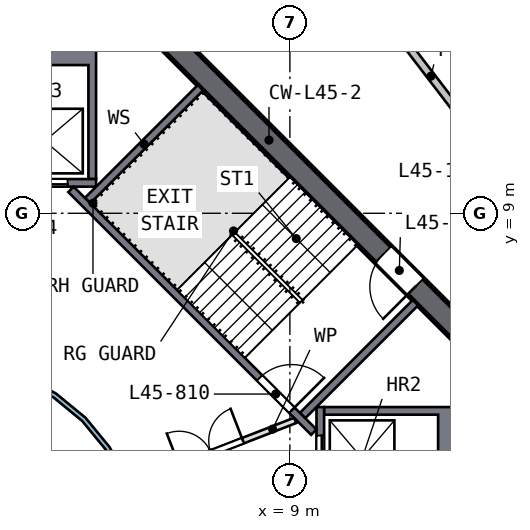
"""IFC4 building model, lengths in metres.
Left out: names, types, materials, properties, quantities, classifications, styles, units other than length and angle.
Written with IfcOpenShell. Run it as: python <this file> out.ifc"""

import sys

from ifc_helpers import new_model, si_unit, direction, frame, frame_2d, origin, place, context, subcontext, project, spatial, polyline, rectangle, outline, extrude, element, fill, save


model = new_model("IFC4")
c1 = context("Model", 3, precision=1e-05, world=origin(), true_north=direction((0.0, 1.0)))
c2 = subcontext(c1, "Body", "Model", "MODEL_VIEW")
j1 = project(units=[si_unit("LENGTHUNIT", "METRE"), si_unit("PLANEANGLEUNIT", "RADIAN")], contexts=[c1])
p1 = place(None, origin())
s1 = spatial("IfcSite", under=j1, at=p1, CompositionType="ELEMENT")
p2 = place(p1, origin())
s2 = spatial("IfcBuilding", under=s1, at=p2, CompositionType="ELEMENT")
p3 = place(p2, frame((0.0, 0.0, 187.0)))
s3 = spatial("IfcBuildingStorey", under=s2, at=p3, CompositionType="ELEMENT", Elevation=187.0)
p4 = place(p3, frame((13.788, 5.587, 0.0), z_axis=(0.0, 0.0, 1.0), x_axis=(-0.707106781, 0.707106781, 0.0)))
e1 = element("IfcWall", 1, at=p4, inside=s3, PredefinedType="SHEAR", context=c2, shape_type="SweptSolid", body=[
    extrude(rectangle(XDim=11.598, YDim=0.6, at=frame_2d((5.799, 0.0))), origin(), (0.0, 0.0, 1.0), 3.5),
])
p5 = place(p4, frame((2.099, 0.0, 0.0)))
e2 = element("IfcOpeningElement", 2, at=p5, cuts=e1, PredefinedType="OPENING", context=c2, shape_type="SweptSolid", body=[
    extrude(rectangle(XDim=1.2, YDim=2.1, at=frame_2d((0.6, 1.05))), frame((0.0, 0.31, 0.0), z_axis=(0.0, -1.0, 0.0), x_axis=(1.0, 0.0, 0.0)), (0.0, 0.0, 1.0), 0.62),
])
p6 = place(p3, origin())
e3 = element("IfcWall", 3, at=p6, inside=s3, PredefinedType="SOLIDWALL", context=c2, shape_type="SweptSolid", body=[
    extrude(outline(polyline([(13.4, 3.9), (13.4, 1.2), (9.9, 1.2), (9.9, 1.4), (12.9, 1.4), (12.9, 3.7), (9.9, 3.7), (9.9, 3.9), (13.4, 3.9)])), origin(), (0.0, 0.0, 1.0), 3.19),
])
p7 = place(p3, frame((9.8, 1.2, 0.0), z_axis=(0.0, 0.0, 1.0), x_axis=(0.0, 1.0, 0.0)))
e4 = element("IfcWall", 4, at=p7, inside=s3, PredefinedType="SOLIDWALL", context=c2, shape_type="SweptSolid", body=[
    extrude(rectangle(XDim=2.7, YDim=0.2, at=frame_2d((1.35, 0.0))), origin(), (0.0, 0.0, 1.0), 3.19),
])
p8 = place(p7, frame((0.75, 0.0, 0.0)))
e5 = element("IfcOpeningElement", 5, at=p8, cuts=e4, PredefinedType="OPENING", context=c2, shape_type="SweptSolid", body=[
    extrude(rectangle(XDim=1.2, YDim=2.1, at=frame_2d((0.6, 1.05))), frame((0.0, 0.11, 0.0), z_axis=(0.0, -1.0, 0.0), x_axis=(1.0, 0.0, 0.0)), (0.0, 0.0, 1.0), 0.22),
])
p9 = place(p3, origin())
e6 = element("IfcWall", 6, at=p9, inside=s3, PredefinedType="SOLIDWALL", context=c2, shape_type="SweptSolid", body=[
    extrude(outline(polyline([(3.9, 9.9), (3.7, 9.9), (3.7, 12.9), (1.4, 12.9), (1.4, 9.9), (1.2, 9.9), (1.2, 13.4), (3.9, 13.4), (3.9, 9.9)])), origin(), (0.0, 0.0, 1.0), 3.19),
])
p10 = place(p3, frame((1.2, 9.8, 0.0), z_axis=(0.0, 0.0, 1.0), x_axis=(1.0, 0.0, 0.0)))
e7 = element("IfcWall", 7, at=p10, inside=s3, PredefinedType="SOLIDWALL", context=c2, shape_type="SweptSolid", body=[
    extrude(rectangle(XDim=2.7, YDim=0.2, at=frame_2d((1.35, 0.0))), origin(), (0.0, 0.0, 1.0), 3.19),
])
p11 = place(p10, frame((0.75, 0.0, 0.0)))
e8 = element("IfcOpeningElement", 8, at=p11, cuts=e7, PredefinedType="OPENING", context=c2, shape_type="SweptSolid", body=[
    extrude(rectangle(XDim=1.2, YDim=2.1, at=frame_2d((0.6, 1.05))), frame((0.0, 0.11, 0.0), z_axis=(0.0, -1.0, 0.0), x_axis=(1.0, 0.0, 0.0)), (0.0, 0.0, 1.0), 0.22),
])
p12 = place(p3, frame((3.24, 9.629, 0.0), z_axis=(0.0, 0.0, 1.0), x_axis=(0.707106781, -0.707106781, 0.0)))
e9 = element("IfcWall", 9, at=p12, inside=s3, PredefinedType="SOLIDWALL", context=c2, shape_type="SweptSolid", body=[
    extrude(rectangle(XDim=9.036, YDim=0.2, at=frame_2d((4.518, 0.0))), origin(), (0.0, 0.0, 1.0), 3.19),
])
p13 = place(p12, frame((7.018, 0.0, 0.0)))
e10 = element("IfcOpeningElement", 10, at=p13, cuts=e9, PredefinedType="OPENING", context=c2, shape_type="SweptSolid", body=[
    extrude(rectangle(XDim=1.2, YDim=2.1, at=frame_2d((0.6, 1.05))), frame((0.0, 0.11, 0.0), z_axis=(0.0, -1.0, 0.0), x_axis=(1.0, 0.0, 0.0)), (0.0, 0.0, 1.0), 0.22),
])
for number, where, z_axis, x_axis in (
    (11, (9.334, 3.677, 0.0), (0.0, 0.0, 1.0), (0.707, 0.707, 0.0)),
    (12, (3.677, 9.334, 0.0), (0.0, 0.0, 1.0), (0.707, 0.707, 0.0)),
):
    element("IfcWall", number, at=place(p3, frame(where, z_axis=z_axis, x_axis=x_axis)), inside=s3, PredefinedType="SOLIDWALL", context=c2, shape_type="SweptSolid", body=[
        extrude(rectangle(XDim=4.2, YDim=0.2, at=frame_2d((2.1, 0.0))), origin(), (0.0, 0.0, 1.0), 3.19),
    ])
p14 = place(p3, frame((4.782, 1.857, 0.0), z_axis=(0.0, 0.0, 1.0), x_axis=(0.932157474, 0.362053096, 0.0)))
e13 = element("IfcWall", 13, at=p14, inside=s3, PredefinedType="PARTITIONING", context=c2, shape_type="SweptSolid", body=[
    extrude(rectangle(XDim=4.675, YDim=0.15, at=frame_2d((2.337, 0.0))), origin(), (0.0, 0.0, 1.0), 3.19),
])
p15 = place(p14, frame((1.4, 0.0, 0.0)))
e14 = element("IfcOpeningElement", 14, at=p15, cuts=e13, PredefinedType="OPENING", context=c2, shape_type="SweptSolid", body=[
    extrude(rectangle(XDim=1.8, YDim=2.1, at=frame_2d((0.9, 1.05))), frame((0.0, 0.085, 0.0), z_axis=(0.0, -1.0, 0.0), x_axis=(1.0, 0.0, 0.0)), (0.0, 0.0, 1.0), 0.17),
])
p16 = place(p3, origin())
e15 = element("IfcWall", 15, at=p16, inside=s3, PredefinedType="SOLIDWALL", context=c2, shape_type="SweptSolid", body=[
    extrude(outline(polyline([(5.021, -0.999), (4.73, -1.959), (4.257, -2.844), (3.62, -3.62), (2.844, -4.257), (1.959, -4.73), (0.999, -5.021), (0.0, -5.12), (-0.999, -5.021), (-1.959, -4.73), (-2.844, -4.257), (-3.62, -3.62), (-4.257, -2.844), (-4.73, -1.959), (-5.021, -0.999), (-5.12, 0.0), (-5.021, 0.999), (-4.73, 1.959), (-4.257, 2.844), (-3.62, 3.62), (-2.844, 4.257), (-1.959, 4.73), (-0.999, 5.021), (0.0, 5.12), (0.999, 5.021), (1.959, 4.73), (2.844, 4.257), (3.62, 3.62), (4.257, 2.844), (4.73, 1.959), (5.021, 0.999), (5.12, 0.0), (5.021, -0.999)]), holes=[polyline([(4.904, 0.976), (4.619, 1.913), (4.157, 2.778), (3.535, 3.535), (2.778, 4.157), (1.913, 4.619), (0.976, 4.904), (0.0, 5.0), (-0.976, 4.904), (-1.913, 4.619), (-2.778, 4.157), (-3.535, 3.535), (-4.157, 2.778), (-4.619, 1.913), (-4.904, 0.976), (-5.0, 0.0), (-4.904, -0.976), (-4.619, -1.913), (-4.157, -2.778), (-3.535, -3.535), (-2.778, -4.157), (-1.913, -4.619), (-0.976, -4.904), (0.0, -5.0), (0.976, -4.904), (1.913, -4.619), (2.778, -4.157), (3.535, -3.535), (4.157, -2.778), (4.619, -1.913), (4.904, -0.976), (5.0, 0.0), (4.904, 0.976)])]), origin(), (0.0, 0.0, 1.0), 3.19),
])
p17 = place(p3, frame((11.208, 14.573, 0.0), z_axis=(0.0, 0.0, 1.0), x_axis=(0.607928573, -0.793991719, 0.0)))
e16 = element("IfcWall", 16, at=p17, inside=s3, PredefinedType="SOLIDWALL", context=c2, shape_type="SweptSolid", body=[
    extrude(rectangle(XDim=9.316, YDim=0.2, at=frame_2d((4.658, 0.0))), origin(), (0.0, 0.0, 1.0), 3.19),
])
p18 = place(p17, frame((5.15, 0.0, 0.0)))
e17 = element("IfcOpeningElement", 17, at=p18, cuts=e16, PredefinedType="OPENING", context=c2, shape_type="SweptSolid", body=[
    extrude(rectangle(XDim=1.0, YDim=2.1, at=frame_2d((0.5, 1.05))), frame((0.0, 0.11, 0.0), z_axis=(0.0, -1.0, 0.0), x_axis=(1.0, 0.0, 0.0)), (0.0, 0.0, 1.0), 0.22),
])
p19 = place(p8, origin())
e18 = element("IfcDoor", 18, at=p19, inside=s3, OperationType="DOUBLE_DOOR_SLIDING", PredefinedType="DOOR", context=c2, shape_type="SweptSolid", body=[
    extrude(rectangle(XDim=1.2, YDim=2.1, at=frame_2d((0.6, 1.05))), frame((0.0, 0.025, 0.0), z_axis=(0.0, -1.0, 0.0), x_axis=(1.0, 0.0, 0.0)), (0.0, 0.0, 1.0), 0.05),
])
fill(e5, e18)
p20 = place(p11, origin())
e19 = element("IfcDoor", 19, at=p20, inside=s3, OperationType="DOUBLE_DOOR_SLIDING", PredefinedType="DOOR", context=c2, shape_type="SweptSolid", body=[
    extrude(rectangle(XDim=1.2, YDim=2.1, at=frame_2d((0.6, 1.05))), frame((0.0, 0.025, 0.0), z_axis=(0.0, -1.0, 0.0), x_axis=(1.0, 0.0, 0.0)), (0.0, 0.0, 1.0), 0.05),
])
fill(e8, e19)
p21 = place(p13, origin())
e20 = element("IfcDoor", 20, at=p21, inside=s3, OperationType="SINGLE_SWING_RIGHT", PredefinedType="DOOR", context=c2, shape_type="SweptSolid", body=[
    extrude(rectangle(XDim=1.2, YDim=2.1, at=frame_2d((0.6, 1.05))), frame((0.0, 0.025, 0.0), z_axis=(0.0, -1.0, 0.0), x_axis=(1.0, 0.0, 0.0)), (0.0, 0.0, 1.0), 0.05),
])
fill(e10, e20)
p22 = place(p5, origin())
e21 = element("IfcDoor", 21, at=p22, inside=s3, OperationType="SINGLE_SWING_LEFT", PredefinedType="DOOR", context=c2, shape_type="SweptSolid", body=[
    extrude(rectangle(XDim=1.2, YDim=2.1, at=frame_2d((0.6, 1.05))), frame((0.0, 0.025, 0.0), z_axis=(0.0, -1.0, 0.0), x_axis=(1.0, 0.0, 0.0)), (0.0, 0.0, 1.0), 0.05),
])
fill(e2, e21)
p23 = place(p15, origin())
e22 = element("IfcDoor", 22, at=p23, inside=s3, OperationType="DOUBLE_DOOR_SINGLE_SWING", PredefinedType="DOOR", context=c2, shape_type="SweptSolid", body=[
    extrude(rectangle(XDim=1.8, YDim=2.1, at=frame_2d((0.9, 1.05))), frame((0.0, 0.025, 0.0), z_axis=(0.0, -1.0, 0.0), x_axis=(1.0, 0.0, 0.0)), (0.0, 0.0, 1.0), 0.05),
])
fill(e14, e22)
save(model, sys.argv[1])
